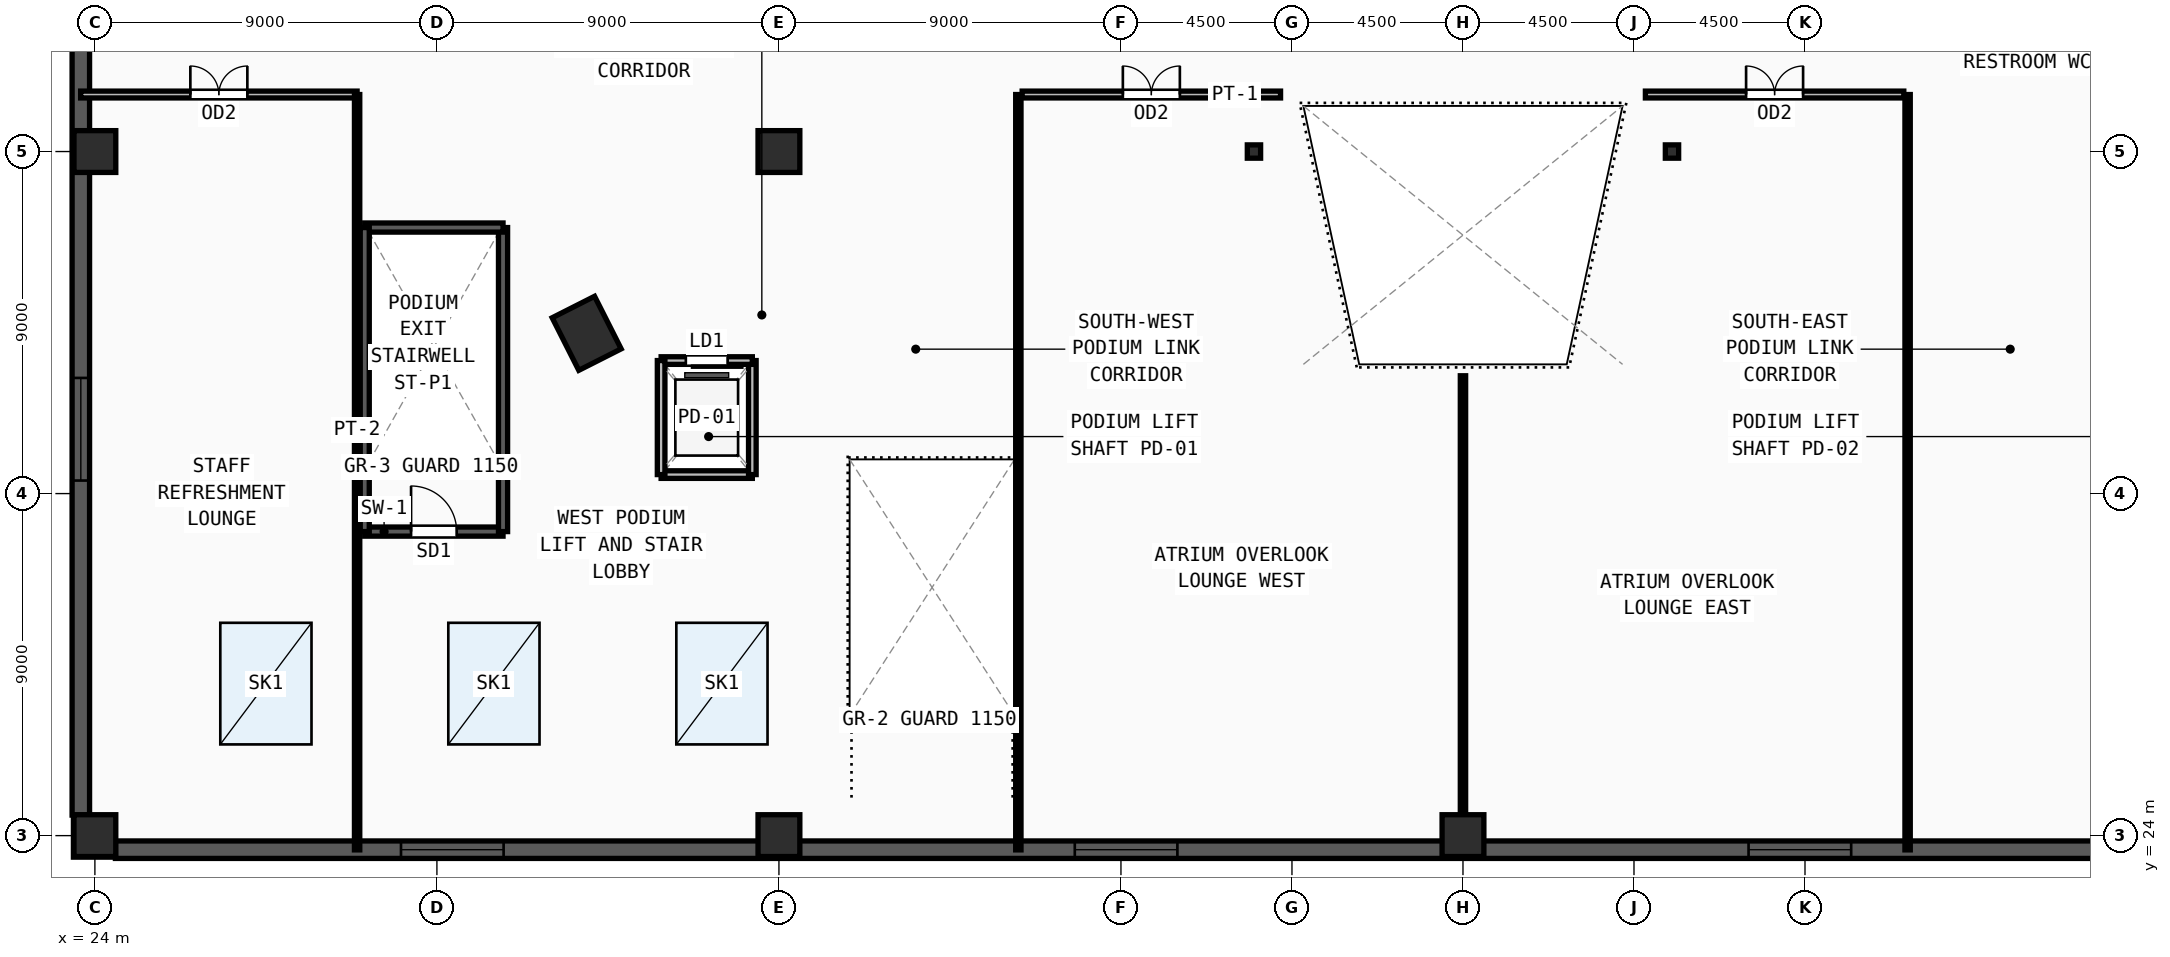
"""IFC4 building model, lengths in metres.
Left out: names, types, materials, properties, quantities, classifications, styles, units other than length and angle.
Written with IfcOpenShell. Run it as: python <this file> out.ifc"""

import sys

from ifc_helpers import new_model, si_unit, direction, frame, frame_2d, origin, origin_2d, place, context, subcontext, project, spatial, rectangle, i_section, extrude, source, transform, mapped, element, fill, save


model = new_model("IFC4")
c1 = context("Model", 3, precision=1e-05, world=origin(), true_north=direction((0.0, 1.0)))
c2 = subcontext(c1, "Body", "Model", "MODEL_VIEW")
j1 = project(units=[si_unit("LENGTHUNIT", "METRE"), si_unit("PLANEANGLEUNIT", "RADIAN")], contexts=[c1])
p1 = place(None, origin())
s1 = spatial("IfcSite", under=j1, at=p1, CompositionType="ELEMENT")
p2 = place(p1, origin())
s2 = spatial("IfcBuilding", under=s1, at=p2, CompositionType="ELEMENT")
p3 = place(p2, frame((0.0, 0.0, 23.4)))
s3 = spatial("IfcBuildingStorey", under=s2, at=p3, CompositionType="ELEMENT", Elevation=23.4)
m1 = source(origin(), c2, "Body", "SweptSolid", [
    extrude(rectangle(XDim=1.55, YDim=1.25, at=origin_2d()), origin(), (0.0, 0.0, 1.0), 5.1),
])
p4 = place(p3, frame((36.941, 37.217, 0.0), z_axis=(0.0, 0.0, 1.0), x_axis=(-0.451500573218, 0.892270829056, 0.0)))
e1 = element("IfcColumn", 1, at=p4, inside=s3, PredefinedType="COLUMN", context=c2, shape_type="MappedRepresentation", body=[
    mapped(m1, transform((0.0, 0.0, 0.0), x_axis=(1.0, 0.0, 0.0), y_axis=(0.0, 1.0, 0.0), z_axis=(0.0, 0.0, 1.0), scale=1.0)),
])
m2 = source(origin(), c2, "Body", "SweptSolid", [
    extrude(rectangle(XDim=1.1, YDim=1.1, at=origin_2d()), origin(), (0.0, 0.0, 1.0), 5.1),
])
for number, where, z_axis, x_axis in (
    (2, (24.0, 24.0, 0.0), (0.0, 0.0, 1.0), (1.0, 0.0, 0.0)),
    (3, (42.0, 24.0, 0.0), (0.0, 0.0, 1.0), (1.0, 0.0, 0.0)),
    (4, (60.0, 24.0, 0.0), (0.0, 0.0, 1.0), (1.0, 0.0, 0.0)),
    (5, (24.0, 42.0, 0.0), (0.0, 0.0, 1.0), (1.0, 0.0, 0.0)),
    (6, (42.0, 42.0, 0.0), (0.0, 0.0, 1.0), (1.0, 0.0, 0.0)),
):
    element("IfcColumn", number, at=place(p3, frame(where, z_axis=z_axis, x_axis=x_axis)), inside=s3, PredefinedType="COLUMN", context=c2, shape_type="MappedRepresentation", body=[
        mapped(m2, transform((0.0, 0.0, 0.0), x_axis=(1.0, 0.0, 0.0), y_axis=(0.0, 1.0, 0.0), z_axis=(0.0, 0.0, 1.0), scale=1.0)),
    ])
m3 = source(origin(), c2, "Body", "SweptSolid", [
    extrude(i_section(OverallWidth=0.35, OverallDepth=0.35, WebThickness=0.012, FlangeThickness=0.019, at=origin_2d()), origin(), (0.0, 0.0, 1.0), 5.1),
])
for number, where, z_axis, x_axis in (
    (7, (54.5, 42.0, 0.0), (0.0, 0.0, 1.0), (1.0, 0.0, 0.0)),
    (8, (65.5, 42.0, 0.0), (0.0, 0.0, 1.0), (1.0, 0.0, 0.0)),
):
    element("IfcColumn", number, at=place(p3, frame(where, z_axis=z_axis, x_axis=x_axis)), inside=s3, PredefinedType="COLUMN", context=c2, shape_type="MappedRepresentation", body=[
        mapped(m3, transform((0.0, 0.0, 0.0), x_axis=(1.0, 0.0, 0.0), y_axis=(0.0, 1.0, 0.0), z_axis=(0.0, 0.0, 1.0), scale=1.0)),
    ])
p5 = place(p3, frame((23.63, 85.46, 0.0), z_axis=(0.0, 0.0, 1.0), x_axis=(0.0, -1.0, 0.0)))
e9 = element("IfcWall", 9, at=p5, inside=s3, PredefinedType="SOLIDWALL", context=c2, shape_type="SweptSolid", body=[
    extrude(rectangle(XDim=60.92, YDim=0.46, at=frame_2d((30.46, 0.0))), origin(), (0.0, 0.0, 1.0), 4.82),
])
m4 = source(origin(), c2, "Body", "SweptSolid", [
    extrude(rectangle(XDim=2.7, YDim=2.35, at=frame_2d((1.35, 1.175))), frame((0.0, 0.24, 0.0), z_axis=(0.0, -1.0, 0.0), x_axis=(1.0, 0.0, 0.0)), (0.0, 0.0, 1.0), 0.48),
])
p6 = place(p5, frame((8.803, 0.0, 0.55)))
e10 = element("IfcOpeningElement", 10, at=p6, cuts=e9, PredefinedType="OPENING", context=c2, shape_type="MappedRepresentation", body=[
    mapped(m4, transform((0.0, 0.0, 0.0), x_axis=(1.0, 0.0, 0.0), y_axis=(0.0, 1.0, 0.0), z_axis=(0.0, 0.0, 1.0), scale=1.0)),
])
p7 = place(p5, frame((18.957, 0.0, 0.55)))
e11 = element("IfcOpeningElement", 11, at=p7, cuts=e9, PredefinedType="OPENING", context=c2, shape_type="MappedRepresentation", body=[
    mapped(m4, transform((0.0, 0.0, 0.0), x_axis=(1.0, 0.0, 0.0), y_axis=(0.0, 1.0, 0.0), z_axis=(0.0, 0.0, 1.0), scale=1.0)),
])
p8 = place(p5, frame((29.11, 0.0, 0.55)))
e12 = element("IfcOpeningElement", 12, at=p8, cuts=e9, PredefinedType="OPENING", context=c2, shape_type="MappedRepresentation", body=[
    mapped(m4, transform((0.0, 0.0, 0.0), x_axis=(1.0, 0.0, 0.0), y_axis=(0.0, 1.0, 0.0), z_axis=(0.0, 0.0, 1.0), scale=1.0)),
])
p9 = place(p5, frame((49.417, 0.0, 0.55)))
e13 = element("IfcOpeningElement", 13, at=p9, cuts=e9, PredefinedType="OPENING", context=c2, shape_type="MappedRepresentation", body=[
    mapped(m4, transform((0.0, 0.0, 0.0), x_axis=(1.0, 0.0, 0.0), y_axis=(0.0, 1.0, 0.0), z_axis=(0.0, 0.0, 1.0), scale=1.0)),
])
p10 = place(p3, frame((24.54, 23.63, 0.0), z_axis=(0.0, 0.0, 1.0), x_axis=(1.0, 0.0, 0.0)))
e14 = element("IfcWall", 14, at=p10, inside=s3, PredefinedType="SOLIDWALL", context=c2, shape_type="SweptSolid", body=[
    extrude(rectangle(XDim=70.92, YDim=0.46, at=frame_2d((35.46, 0.0))), origin(), (0.0, 0.0, 1.0), 4.82),
])
p11 = place(p10, frame((7.515, 0.0, 0.55)))
e15 = element("IfcOpeningElement", 15, at=p11, cuts=e14, PredefinedType="OPENING", context=c2, shape_type="MappedRepresentation", body=[
    mapped(m4, transform((0.0, 0.0, 0.0), x_axis=(1.0, 0.0, 0.0), y_axis=(0.0, 1.0, 0.0), z_axis=(0.0, 0.0, 1.0), scale=1.0)),
])
p12 = place(p10, frame((25.245, 0.0, 0.55)))
e16 = element("IfcOpeningElement", 16, at=p12, cuts=e14, PredefinedType="OPENING", context=c2, shape_type="MappedRepresentation", body=[
    mapped(m4, transform((0.0, 0.0, 0.0), x_axis=(1.0, 0.0, 0.0), y_axis=(0.0, 1.0, 0.0), z_axis=(0.0, 0.0, 1.0), scale=1.0)),
])
p13 = place(p10, frame((42.975, 0.0, 0.55)))
e17 = element("IfcOpeningElement", 17, at=p13, cuts=e14, PredefinedType="OPENING", context=c2, shape_type="MappedRepresentation", body=[
    mapped(m4, transform((0.0, 0.0, 0.0), x_axis=(1.0, 0.0, 0.0), y_axis=(0.0, 1.0, 0.0), z_axis=(0.0, 0.0, 1.0), scale=1.0)),
])
p14 = place(p3, frame((31.1, 32.0, 0.0), z_axis=(0.0, 0.0, 1.0), x_axis=(1.0, 0.0, 0.0)))
e18 = element("IfcWall", 18, at=p14, inside=s3, PredefinedType="SOLIDWALL", context=c2, shape_type="SweptSolid", body=[
    extrude(rectangle(XDim=3.64, YDim=0.24, at=frame_2d((1.82, 0.0))), origin(), (0.0, 0.0, 1.0), 4.82),
])
m5 = source(origin(), c2, "Body", "SweptSolid", [
    extrude(rectangle(XDim=1.2, YDim=2.2, at=frame_2d((0.6, 1.1))), frame((0.0, 0.13, 0.0), z_axis=(0.0, -1.0, 0.0), x_axis=(1.0, 0.0, 0.0)), (0.0, 0.0, 1.0), 0.26),
])
p15 = place(p14, frame((1.22, 0.0, 0.0)))
e19 = element("IfcOpeningElement", 19, at=p15, cuts=e18, PredefinedType="OPENING", context=c2, shape_type="MappedRepresentation", body=[
    mapped(m5, transform((0.0, 0.0, 0.0), x_axis=(1.0, 0.0, 0.0), y_axis=(0.0, 1.0, 0.0), z_axis=(0.0, 0.0, 1.0), scale=1.0)),
])
p16 = place(p3, frame((34.74, 32.0, 0.0), z_axis=(0.0, 0.0, 1.0), x_axis=(0.0, 1.0, 0.0)))
e20 = element("IfcWall", 20, at=p16, inside=s3, PredefinedType="SOLIDWALL", context=c2, shape_type="SweptSolid", body=[
    extrude(rectangle(XDim=8.0, YDim=0.24, at=frame_2d((4.0, 0.0))), origin(), (0.0, 0.0, 1.0), 4.82),
])
p17 = place(p3, frame((34.74, 40.0, 0.0), z_axis=(0.0, 0.0, 1.0), x_axis=(-1.0, 0.0, 0.0)))
e21 = element("IfcWall", 21, at=p17, inside=s3, PredefinedType="SOLIDWALL", context=c2, shape_type="SweptSolid", body=[
    extrude(rectangle(XDim=3.64, YDim=0.24, at=frame_2d((1.82, 0.0))), origin(), (0.0, 0.0, 1.0), 4.82),
])
p18 = place(p3, frame((31.1, 40.0, 0.0), z_axis=(0.0, 0.0, 1.0), x_axis=(0.0, -1.0, 0.0)))
e22 = element("IfcWall", 22, at=p18, inside=s3, PredefinedType="SOLIDWALL", context=c2, shape_type="SweptSolid", body=[
    extrude(rectangle(XDim=8.0, YDim=0.24, at=frame_2d((4.0, 0.0))), origin(), (0.0, 0.0, 1.0), 4.82),
])
p19 = place(p3, frame((38.9, 33.5, 0.0), z_axis=(0.0, 0.0, 1.0), x_axis=(1.0, 0.0, 0.0)))
e23 = element("IfcWall", 23, at=p19, inside=s3, PredefinedType="SOLIDWALL", context=c2, shape_type="SweptSolid", body=[
    extrude(rectangle(XDim=2.4, YDim=0.2, at=frame_2d((1.2, 0.0))), origin(), (0.0, 0.0, 1.0), 4.82),
])
p20 = place(p3, frame((41.3, 33.5, 0.0), z_axis=(0.0, 0.0, 1.0), x_axis=(0.0, 1.0, 0.0)))
e24 = element("IfcWall", 24, at=p20, inside=s3, PredefinedType="SOLIDWALL", context=c2, shape_type="SweptSolid", body=[
    extrude(rectangle(XDim=3.0, YDim=0.2, at=frame_2d((1.5, 0.0))), origin(), (0.0, 0.0, 1.0), 4.82),
])
p21 = place(p3, frame((41.3, 36.5, 0.0), z_axis=(0.0, 0.0, 1.0), x_axis=(-1.0, 0.0, 0.0)))
e25 = element("IfcWall", 25, at=p21, inside=s3, PredefinedType="SOLIDWALL", context=c2, shape_type="SweptSolid", body=[
    extrude(rectangle(XDim=2.4, YDim=0.2, at=frame_2d((1.2, 0.0))), origin(), (0.0, 0.0, 1.0), 4.82),
])
m6 = source(origin(), c2, "Body", "SweptSolid", [
    extrude(rectangle(XDim=1.1, YDim=2.2, at=frame_2d((0.55, 1.1))), frame((0.0, 0.11, 0.0), z_axis=(0.0, -1.0, 0.0), x_axis=(1.0, 0.0, 0.0)), (0.0, 0.0, 1.0), 0.22),
])
p22 = place(p21, frame((0.65, 0.0, 0.0)))
e26 = element("IfcOpeningElement", 26, at=p22, cuts=e25, PredefinedType="OPENING", context=c2, shape_type="MappedRepresentation", body=[
    mapped(m6, transform((0.0, 0.0, 0.0), x_axis=(1.0, 0.0, 0.0), y_axis=(0.0, 1.0, 0.0), z_axis=(0.0, 0.0, 1.0), scale=1.0)),
])
p23 = place(p3, frame((38.9, 36.5, 0.0), z_axis=(0.0, 0.0, 1.0), x_axis=(0.0, -1.0, 0.0)))
e27 = element("IfcWall", 27, at=p23, inside=s3, PredefinedType="SOLIDWALL", context=c2, shape_type="SweptSolid", body=[
    extrude(rectangle(XDim=3.0, YDim=0.2, at=frame_2d((1.5, 0.0))), origin(), (0.0, 0.0, 1.0), 4.82),
])
p24 = place(p3, frame((48.4, 43.5, 0.0), z_axis=(0.0, 0.0, 1.0), x_axis=(1.0, 0.0, 0.0)))
e28 = element("IfcWall", 28, at=p24, inside=s3, PredefinedType="PARTITIONING", context=c2, shape_type="SweptSolid", body=[
    extrude(rectangle(XDim=6.8, YDim=0.18, at=frame_2d((3.4, 0.0))), origin(), (0.0, 0.0, 1.0), 4.82),
])
m7 = source(origin(), c2, "Body", "SweptSolid", [
    extrude(rectangle(XDim=1.5, YDim=2.2, at=frame_2d((0.75, 1.1))), frame((0.0, 0.1, 0.0), z_axis=(0.0, -1.0, 0.0), x_axis=(1.0, 0.0, 0.0)), (0.0, 0.0, 1.0), 0.2),
])
p25 = place(p24, frame((2.65, 0.0, 0.0)))
e29 = element("IfcOpeningElement", 29, at=p25, cuts=e28, PredefinedType="OPENING", context=c2, shape_type="MappedRepresentation", body=[
    mapped(m7, transform((0.0, 0.0, 0.0), x_axis=(1.0, 0.0, 0.0), y_axis=(0.0, 1.0, 0.0), z_axis=(0.0, 0.0, 1.0), scale=1.0)),
])
p26 = place(p3, frame((64.8, 43.5, 0.0), z_axis=(0.0, 0.0, 1.0), x_axis=(1.0, 0.0, 0.0)))
e30 = element("IfcWall", 30, at=p26, inside=s3, PredefinedType="PARTITIONING", context=c2, shape_type="SweptSolid", body=[
    extrude(rectangle(XDim=6.8, YDim=0.18, at=frame_2d((3.4, 0.0))), origin(), (0.0, 0.0, 1.0), 4.82),
])
p27 = place(p26, frame((2.65, 0.0, 0.0)))
e31 = element("IfcOpeningElement", 31, at=p27, cuts=e30, PredefinedType="OPENING", context=c2, shape_type="MappedRepresentation", body=[
    mapped(m7, transform((0.0, 0.0, 0.0), x_axis=(1.0, 0.0, 0.0), y_axis=(0.0, 1.0, 0.0), z_axis=(0.0, 0.0, 1.0), scale=1.0)),
])
p28 = place(p3, frame((23.625, 43.5, 0.0), z_axis=(0.0, 0.0, 1.0), x_axis=(1.0, 0.0, 0.0)))
e32 = element("IfcWall", 32, at=p28, inside=s3, PredefinedType="PARTITIONING", context=c2, shape_type="SweptSolid", body=[
    extrude(rectangle(XDim=7.275, YDim=0.18, at=frame_2d((3.637, 0.0))), origin(), (0.0, 0.0, 1.0), 4.82),
])
p29 = place(p28, frame((2.887, 0.0, 0.0)))
e33 = element("IfcOpeningElement", 33, at=p29, cuts=e32, PredefinedType="OPENING", context=c2, shape_type="MappedRepresentation", body=[
    mapped(m7, transform((0.0, 0.0, 0.0), x_axis=(1.0, 0.0, 0.0), y_axis=(0.0, 1.0, 0.0), z_axis=(0.0, 0.0, 1.0), scale=1.0)),
])
for number, where, z_axis, x_axis in (
    (34, (30.9, 23.625, 0.0), (0.0, 0.0, 1.0), (0.0, 1.0, 0.0)),
    (35, (48.3, 23.625, 0.0), (0.0, 0.0, 1.0), (0.0, 1.0, 0.0)),
    (36, (71.7, 23.625, 0.0), (0.0, 0.0, 1.0), (0.0, 1.0, 0.0)),
):
    element("IfcWall", number, at=place(p3, frame(where, z_axis=z_axis, x_axis=x_axis)), inside=s3, PredefinedType="PARTITIONING", context=c2, shape_type="SweptSolid", body=[
        extrude(rectangle(XDim=19.875, YDim=0.14, at=frame_2d((9.938, 0.0))), origin(), (0.0, 0.0, 1.0), 4.82),
    ])
p30 = place(p3, frame((60.0, 23.625, 0.0), z_axis=(0.0, 0.0, 1.0), x_axis=(0.0, 1.0, 0.0)))
e37 = element("IfcWall", 37, at=p30, inside=s3, PredefinedType="PARTITIONING", context=c2, shape_type="SweptSolid", body=[
    extrude(rectangle(XDim=12.475, YDim=0.14, at=frame_2d((6.238, 0.0))), origin(), (0.0, 0.0, 1.0), 3.335),
])
m8 = source(origin(), c2, "Body", "SweptSolid", [
    extrude(rectangle(XDim=2.7, YDim=2.35, at=frame_2d((1.35, 1.175))), frame((0.0, 0.03, 0.0), z_axis=(0.0, -1.0, 0.0), x_axis=(1.0, 0.0, 0.0)), (0.0, 0.0, 1.0), 0.06),
])
p31 = place(p9, origin())
e38 = element("IfcWindow", 38, at=p31, inside=s3, PartitioningType="TRIPLE_PANEL_VERTICAL", PredefinedType="WINDOW", context=c2, shape_type="MappedRepresentation", body=[
    mapped(m8, transform((0.0, 0.0, 0.0), x_axis=(1.0, 0.0, 0.0), y_axis=(0.0, 1.0, 0.0), z_axis=(0.0, 0.0, 1.0), scale=1.0)),
])
fill(e13, e38)
p32 = place(p11, origin())
e39 = element("IfcWindow", 39, at=p32, inside=s3, PartitioningType="TRIPLE_PANEL_VERTICAL", PredefinedType="WINDOW", context=c2, shape_type="MappedRepresentation", body=[
    mapped(m8, transform((0.0, 0.0, 0.0), x_axis=(1.0, 0.0, 0.0), y_axis=(0.0, 1.0, 0.0), z_axis=(0.0, 0.0, 1.0), scale=1.0)),
])
fill(e15, e39)
p33 = place(p12, origin())
e40 = element("IfcWindow", 40, at=p33, inside=s3, PartitioningType="TRIPLE_PANEL_VERTICAL", PredefinedType="WINDOW", context=c2, shape_type="MappedRepresentation", body=[
    mapped(m8, transform((0.0, 0.0, 0.0), x_axis=(1.0, 0.0, 0.0), y_axis=(0.0, 1.0, 0.0), z_axis=(0.0, 0.0, 1.0), scale=1.0)),
])
fill(e16, e40)
p34 = place(p13, origin())
e41 = element("IfcWindow", 41, at=p34, inside=s3, PartitioningType="TRIPLE_PANEL_VERTICAL", PredefinedType="WINDOW", context=c2, shape_type="MappedRepresentation", body=[
    mapped(m8, transform((0.0, 0.0, 0.0), x_axis=(1.0, 0.0, 0.0), y_axis=(0.0, 1.0, 0.0), z_axis=(0.0, 0.0, 1.0), scale=1.0)),
])
fill(e17, e41)
p35 = place(p3, frame((0.0, 0.0, -0.9)))
p36 = place(p35, frame((28.5, 28.0, 0.0)))
p37 = place(p36, frame((0.0, 0.0, 0.85)))
e42 = element("IfcWindow", 42, at=p37, inside=s3, PartitioningType="SINGLE_PANEL", PredefinedType="SKYLIGHT", context=c2, shape_type="SweptSolid", body=[
    extrude(rectangle(XDim=2.4, YDim=3.2, at=origin_2d()), origin(), (0.0, 0.0, 1.0), 0.05),
])
p38 = place(p35, frame((34.5, 28.0, 0.0)))
p39 = place(p38, frame((0.0, 0.0, 0.85)))
e43 = element("IfcWindow", 43, at=p39, inside=s3, PartitioningType="SINGLE_PANEL", PredefinedType="SKYLIGHT", context=c2, shape_type="SweptSolid", body=[
    extrude(rectangle(XDim=2.4, YDim=3.2, at=origin_2d()), origin(), (0.0, 0.0, 1.0), 0.05),
])
p40 = place(p35, frame((40.5, 28.0, 0.0)))
p41 = place(p40, frame((0.0, 0.0, 0.85)))
e44 = element("IfcWindow", 44, at=p41, inside=s3, PartitioningType="SINGLE_PANEL", PredefinedType="SKYLIGHT", context=c2, shape_type="SweptSolid", body=[
    extrude(rectangle(XDim=2.4, YDim=3.2, at=origin_2d()), origin(), (0.0, 0.0, 1.0), 0.05),
])
m9 = source(origin(), c2, "Body", "SweptSolid", [
    extrude(rectangle(XDim=1.2, YDim=2.2, at=frame_2d((0.6, 1.1))), frame((0.0, 0.025, 0.0), z_axis=(0.0, -1.0, 0.0), x_axis=(1.0, 0.0, 0.0)), (0.0, 0.0, 1.0), 0.05),
])
p42 = place(p15, origin())
e45 = element("IfcDoor", 45, at=p42, inside=s3, OperationType="SINGLE_SWING_LEFT", PredefinedType="DOOR", context=c2, shape_type="MappedRepresentation", body=[
    mapped(m9, transform((0.0, 0.0, 0.0), x_axis=(1.0, 0.0, 0.0), y_axis=(0.0, 1.0, 0.0), z_axis=(0.0, 0.0, 1.0), scale=1.0)),
])
fill(e19, e45)
m10 = source(origin(), c2, "Body", "SweptSolid", [
    extrude(rectangle(XDim=1.1, YDim=2.2, at=frame_2d((0.55, 1.1))), frame((0.0, 0.025, 0.0), z_axis=(0.0, -1.0, 0.0), x_axis=(1.0, 0.0, 0.0)), (0.0, 0.0, 1.0), 0.05),
])
p43 = place(p22, origin())
e46 = element("IfcDoor", 46, at=p43, inside=s3, OperationType="SLIDING_TO_LEFT", PredefinedType="DOOR", context=c2, shape_type="MappedRepresentation", body=[
    mapped(m10, transform((0.0, 0.0, 0.0), x_axis=(1.0, 0.0, 0.0), y_axis=(0.0, 1.0, 0.0), z_axis=(0.0, 0.0, 1.0), scale=1.0)),
])
fill(e26, e46)
m11 = source(origin(), c2, "Body", "SweptSolid", [
    extrude(rectangle(XDim=1.5, YDim=2.2, at=frame_2d((0.75, 1.1))), frame((0.0, 0.025, 0.0), z_axis=(0.0, -1.0, 0.0), x_axis=(1.0, 0.0, 0.0)), (0.0, 0.0, 1.0), 0.05),
])
p44 = place(p25, origin())
e47 = element("IfcDoor", 47, at=p44, inside=s3, OperationType="DOUBLE_DOOR_SINGLE_SWING", PredefinedType="DOOR", context=c2, shape_type="MappedRepresentation", body=[
    mapped(m11, transform((0.0, 0.0, 0.0), x_axis=(1.0, 0.0, 0.0), y_axis=(0.0, 1.0, 0.0), z_axis=(0.0, 0.0, 1.0), scale=1.0)),
])
fill(e29, e47)
p45 = place(p27, origin())
e48 = element("IfcDoor", 48, at=p45, inside=s3, OperationType="DOUBLE_DOOR_SINGLE_SWING", PredefinedType="DOOR", context=c2, shape_type="MappedRepresentation", body=[
    mapped(m11, transform((0.0, 0.0, 0.0), x_axis=(1.0, 0.0, 0.0), y_axis=(0.0, 1.0, 0.0), z_axis=(0.0, 0.0, 1.0), scale=1.0)),
])
fill(e31, e48)
p46 = place(p29, origin())
e49 = element("IfcDoor", 49, at=p46, inside=s3, OperationType="DOUBLE_DOOR_SINGLE_SWING", PredefinedType="DOOR", context=c2, shape_type="MappedRepresentation", body=[
    mapped(m11, transform((0.0, 0.0, 0.0), x_axis=(1.0, 0.0, 0.0), y_axis=(0.0, 1.0, 0.0), z_axis=(0.0, 0.0, 1.0), scale=1.0)),
])
fill(e33, e49)
save(model, sys.argv[1])
